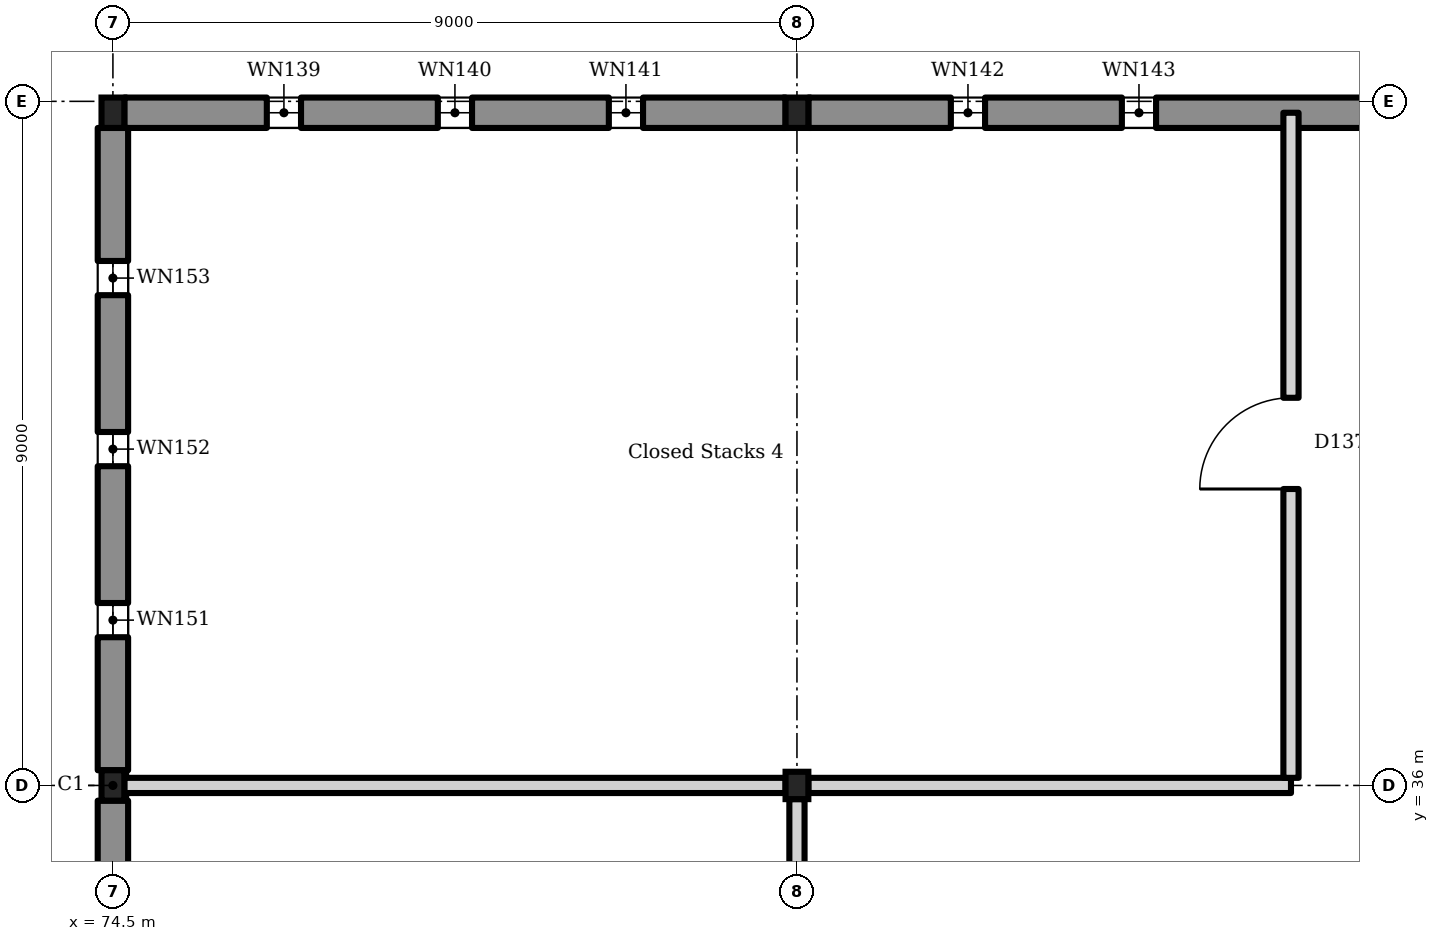
"""IFC4 building model, lengths in metres.
Left out: names, types, materials, properties, quantities, classifications, styles, units other than length and angle.
Written with IfcOpenShell. Run it as: python <this file> out.ifc"""

import sys

from ifc_helpers import new_model, si_unit, direction, frame, frame_2d, origin, origin_2d, place, context, subcontext, project, spatial, rectangle, i_section, extrude, element, fill, save


model = new_model("IFC4")
c1 = context("Model", 3, precision=1e-05, world=origin(), true_north=direction((0.0, 1.0)))
c2 = subcontext(c1, "Body", "Model", "MODEL_VIEW")
j1 = project(units=[si_unit("LENGTHUNIT", "METRE"), si_unit("PLANEANGLEUNIT", "RADIAN")], contexts=[c1])
p1 = place(None, origin())
s1 = spatial("IfcSite", under=j1, at=p1, CompositionType="ELEMENT")
p2 = place(p1, origin())
s2 = spatial("IfcBuilding", under=s1, at=p2, CompositionType="ELEMENT")
p3 = place(p2, frame((0.0, 0.0, 18.9)))
s3 = spatial("IfcBuildingStorey", under=s2, at=p3, CompositionType="ELEMENT", Elevation=18.9)
p4 = place(p3, frame((74.5, 36.0, 0.0), z_axis=(0.0, 0.0, 1.0), x_axis=(1.0, 0.0, 0.0)))
e1 = element("IfcColumn", 1, at=p4, inside=s3, PredefinedType="COLUMN", context=c2, shape_type="SweptSolid", body=[
    extrude(i_section(OverallWidth=0.3, OverallDepth=0.4, WebThickness=0.013, FlangeThickness=0.024, FilletRadius=0.027, at=origin_2d()), origin(), (0.0, 0.0, 1.0), 4.5),
])
p5 = place(p3, frame((83.5, 36.0, 0.0), z_axis=(0.0, 0.0, 1.0), x_axis=(1.0, 0.0, 0.0)))
e2 = element("IfcColumn", 2, at=p5, inside=s3, PredefinedType="COLUMN", context=c2, shape_type="SweptSolid", body=[
    extrude(i_section(OverallWidth=0.3, OverallDepth=0.36, WebThickness=0.012, FlangeThickness=0.022, FilletRadius=0.027, at=origin_2d()), origin(), (0.0, 0.0, 1.0), 4.5),
])
for number, where, z_axis, x_axis in (
    (3, (74.5, 44.85, 0.0), (0.0, 0.0, 1.0), (1.0, 0.0, 0.0)),
    (4, (83.5, 44.85, 0.0), (0.0, 0.0, 1.0), (1.0, 0.0, 0.0)),
):
    element("IfcColumn", number, at=place(p3, frame(where, z_axis=z_axis, x_axis=x_axis)), inside=s3, PredefinedType="COLUMN", context=c2, shape_type="SweptSolid", body=[
        extrude(i_section(OverallWidth=0.3, OverallDepth=0.4, WebThickness=0.013, FlangeThickness=0.024, FilletRadius=0.027, at=origin_2d()), origin(), (0.0, 0.0, 1.0), 4.5),
    ])
p6 = place(p3, frame((74.65, 44.85, 0.0), z_axis=(0.0, 0.0, 1.0), x_axis=(1.0, 0.0, 0.0)))
e5 = element("IfcWall", 5, at=p6, inside=s3, PredefinedType="SOLIDWALL", context=c2, shape_type="SweptSolid", body=[
    extrude(rectangle(XDim=8.7, YDim=0.4, at=frame_2d((4.35, 0.0))), origin(), (0.0, 0.0, 1.0), 4.5),
])
p7 = place(p6, frame((1.875, 0.0, 0.9)))
e6 = element("IfcOpeningElement", 6, at=p7, cuts=e5, PredefinedType="OPENING", context=c2, shape_type="SweptSolid", body=[
    extrude(rectangle(XDim=0.45, YDim=2.6, at=frame_2d((0.225, 1.3))), frame((0.0, 0.21, 0.0), z_axis=(0.0, -1.0, 0.0), x_axis=(1.0, 0.0, 0.0)), (0.0, 0.0, 1.0), 0.42),
])
p8 = place(p6, frame((4.125, 0.0, 0.9)))
e7 = element("IfcOpeningElement", 7, at=p8, cuts=e5, PredefinedType="OPENING", context=c2, shape_type="SweptSolid", body=[
    extrude(rectangle(XDim=0.45, YDim=2.6, at=frame_2d((0.225, 1.3))), frame((0.0, 0.21, 0.0), z_axis=(0.0, -1.0, 0.0), x_axis=(1.0, 0.0, 0.0)), (0.0, 0.0, 1.0), 0.42),
])
p9 = place(p6, frame((6.375, 0.0, 0.9)))
e8 = element("IfcOpeningElement", 8, at=p9, cuts=e5, PredefinedType="OPENING", context=c2, shape_type="SweptSolid", body=[
    extrude(rectangle(XDim=0.45, YDim=2.6, at=frame_2d((0.225, 1.3))), frame((0.0, 0.21, 0.0), z_axis=(0.0, -1.0, 0.0), x_axis=(1.0, 0.0, 0.0)), (0.0, 0.0, 1.0), 0.42),
])
p10 = place(p3, frame((83.65, 44.85, 0.0), z_axis=(0.0, 0.0, 1.0), x_axis=(1.0, 0.0, 0.0)))
e9 = element("IfcWall", 9, at=p10, inside=s3, PredefinedType="SOLIDWALL", context=c2, shape_type="SweptSolid", body=[
    extrude(rectangle(XDim=8.7, YDim=0.4, at=frame_2d((4.35, 0.0))), origin(), (0.0, 0.0, 1.0), 4.5),
])
p11 = place(p10, frame((1.875, 0.0, 0.9)))
e10 = element("IfcOpeningElement", 10, at=p11, cuts=e9, PredefinedType="OPENING", context=c2, shape_type="SweptSolid", body=[
    extrude(rectangle(XDim=0.45, YDim=2.6, at=frame_2d((0.225, 1.3))), frame((0.0, 0.21, 0.0), z_axis=(0.0, -1.0, 0.0), x_axis=(1.0, 0.0, 0.0)), (0.0, 0.0, 1.0), 0.42),
])
p12 = place(p10, frame((4.125, 0.0, 0.9)))
e11 = element("IfcOpeningElement", 11, at=p12, cuts=e9, PredefinedType="OPENING", context=c2, shape_type="SweptSolid", body=[
    extrude(rectangle(XDim=0.45, YDim=2.6, at=frame_2d((0.225, 1.3))), frame((0.0, 0.21, 0.0), z_axis=(0.0, -1.0, 0.0), x_axis=(1.0, 0.0, 0.0)), (0.0, 0.0, 1.0), 0.42),
])
p13 = place(p3, frame((74.5, 27.2, 0.0), z_axis=(0.0, 0.0, 1.0), x_axis=(0.0, 1.0, 0.0)))
e12 = element("IfcWall", 12, at=p13, inside=s3, PredefinedType="SOLIDWALL", context=c2, shape_type="SweptSolid", body=[
    extrude(rectangle(XDim=8.6, YDim=0.4, at=frame_2d((4.3, 0.0))), origin(), (0.0, 0.0, 1.0), 4.5),
])
p14 = place(p13, frame((1.825, 0.0, 0.9)))
e13 = element("IfcOpeningElement", 13, at=p14, cuts=e12, PredefinedType="OPENING", context=c2, shape_type="SweptSolid", body=[
    extrude(rectangle(XDim=0.45, YDim=2.6, at=frame_2d((0.225, 1.3))), frame((0.0, 0.21, 0.0), z_axis=(0.0, -1.0, 0.0), x_axis=(1.0, 0.0, 0.0)), (0.0, 0.0, 1.0), 0.42),
])
p15 = place(p3, frame((74.5, 36.2, 0.0), z_axis=(0.0, 0.0, 1.0), x_axis=(0.0, 1.0, 0.0)))
e14 = element("IfcWall", 14, at=p15, inside=s3, PredefinedType="SOLIDWALL", context=c2, shape_type="SweptSolid", body=[
    extrude(rectangle(XDim=8.45, YDim=0.4, at=frame_2d((4.225, 0.0))), origin(), (0.0, 0.0, 1.0), 4.5),
])
p16 = place(p15, frame((1.75, 0.0, 0.9)))
e15 = element("IfcOpeningElement", 15, at=p16, cuts=e14, PredefinedType="OPENING", context=c2, shape_type="SweptSolid", body=[
    extrude(rectangle(XDim=0.45, YDim=2.6, at=frame_2d((0.225, 1.3))), frame((0.0, 0.21, 0.0), z_axis=(0.0, -1.0, 0.0), x_axis=(1.0, 0.0, 0.0)), (0.0, 0.0, 1.0), 0.42),
])
p17 = place(p15, frame((4.0, 0.0, 0.9)))
e16 = element("IfcOpeningElement", 16, at=p17, cuts=e14, PredefinedType="OPENING", context=c2, shape_type="SweptSolid", body=[
    extrude(rectangle(XDim=0.45, YDim=2.6, at=frame_2d((0.225, 1.3))), frame((0.0, 0.21, 0.0), z_axis=(0.0, -1.0, 0.0), x_axis=(1.0, 0.0, 0.0)), (0.0, 0.0, 1.0), 0.42),
])
p18 = place(p15, frame((6.25, 0.0, 0.9)))
e17 = element("IfcOpeningElement", 17, at=p18, cuts=e14, PredefinedType="OPENING", context=c2, shape_type="SweptSolid", body=[
    extrude(rectangle(XDim=0.45, YDim=2.6, at=frame_2d((0.225, 1.3))), frame((0.0, 0.21, 0.0), z_axis=(0.0, -1.0, 0.0), x_axis=(1.0, 0.0, 0.0)), (0.0, 0.0, 1.0), 0.42),
])
p19 = place(p3, frame((74.65, 36.0, 0.0), z_axis=(0.0, 0.0, 1.0), x_axis=(1.0, 0.0, 0.0)))
e18 = element("IfcWall", 18, at=p19, inside=s3, PredefinedType="SOLIDWALL", context=c2, shape_type="SweptSolid", body=[
    extrude(rectangle(XDim=8.7, YDim=0.2, at=frame_2d((4.35, 0.0))), origin(), (0.0, 0.0, 1.0), 3.6),
])
p20 = place(p3, frame((83.65, 36.0, 0.0), z_axis=(0.0, 0.0, 1.0), x_axis=(1.0, 0.0, 0.0)))
e19 = element("IfcWall", 19, at=p20, inside=s3, PredefinedType="SOLIDWALL", context=c2, shape_type="SweptSolid", body=[
    extrude(rectangle(XDim=6.35, YDim=0.2, at=frame_2d((3.175, 0.0))), origin(), (0.0, 0.0, 1.0), 3.6),
])
p21 = place(p3, frame((83.5, 31.6, 0.0), z_axis=(0.0, 0.0, 1.0), x_axis=(0.0, 1.0, 0.0)))
e20 = element("IfcWall", 20, at=p21, inside=s3, PredefinedType="SOLIDWALL", context=c2, shape_type="SweptSolid", body=[
    extrude(rectangle(XDim=4.22, YDim=0.2, at=frame_2d((2.11, 0.0))), origin(), (0.0, 0.0, 1.0), 3.6),
])
p22 = place(p21, frame((1.55, 0.0, 0.0)))
e21 = element("IfcOpeningElement", 21, at=p22, cuts=e20, PredefinedType="OPENING", context=c2, shape_type="SweptSolid", body=[
    extrude(rectangle(XDim=1.2, YDim=2.1, at=frame_2d((0.6, 1.05))), frame((0.0, 0.11, 0.0), z_axis=(0.0, -1.0, 0.0), x_axis=(1.0, 0.0, 0.0)), (0.0, 0.0, 1.0), 0.22),
])
p23 = place(p3, frame((90.0, 36.1, 0.0), z_axis=(0.0, 0.0, 1.0), x_axis=(0.0, 1.0, 0.0)))
e22 = element("IfcWall", 22, at=p23, inside=s3, PredefinedType="SOLIDWALL", context=c2, shape_type="SweptSolid", body=[
    extrude(rectangle(XDim=8.75, YDim=0.2, at=frame_2d((4.375, 0.0))), origin(), (0.0, 0.0, 1.0), 3.6),
])
p24 = place(p23, frame((3.8, 0.0, 0.0)))
e23 = element("IfcOpeningElement", 23, at=p24, cuts=e22, PredefinedType="OPENING", context=c2, shape_type="SweptSolid", body=[
    extrude(rectangle(XDim=1.2, YDim=2.1, at=frame_2d((0.6, 1.05))), frame((0.0, 0.11, 0.0), z_axis=(0.0, -1.0, 0.0), x_axis=(1.0, 0.0, 0.0)), (0.0, 0.0, 1.0), 0.22),
])
p25 = place(p7, origin())
e24 = element("IfcWindow", 24, at=p25, inside=s3, PartitioningType="SINGLE_PANEL", PredefinedType="WINDOW", context=c2, shape_type="SweptSolid", body=[
    extrude(rectangle(XDim=0.45, YDim=2.6, at=frame_2d((0.225, 1.3))), frame((0.0, 0.03, 0.0), z_axis=(0.0, -1.0, 0.0), x_axis=(1.0, 0.0, 0.0)), (0.0, 0.0, 1.0), 0.06),
])
fill(e6, e24)
p26 = place(p8, origin())
e25 = element("IfcWindow", 25, at=p26, inside=s3, PartitioningType="SINGLE_PANEL", PredefinedType="WINDOW", context=c2, shape_type="SweptSolid", body=[
    extrude(rectangle(XDim=0.45, YDim=2.6, at=frame_2d((0.225, 1.3))), frame((0.0, 0.03, 0.0), z_axis=(0.0, -1.0, 0.0), x_axis=(1.0, 0.0, 0.0)), (0.0, 0.0, 1.0), 0.06),
])
fill(e7, e25)
p27 = place(p9, origin())
e26 = element("IfcWindow", 26, at=p27, inside=s3, PartitioningType="SINGLE_PANEL", PredefinedType="WINDOW", context=c2, shape_type="SweptSolid", body=[
    extrude(rectangle(XDim=0.45, YDim=2.6, at=frame_2d((0.225, 1.3))), frame((0.0, 0.03, 0.0), z_axis=(0.0, -1.0, 0.0), x_axis=(1.0, 0.0, 0.0)), (0.0, 0.0, 1.0), 0.06),
])
fill(e8, e26)
p28 = place(p11, origin())
e27 = element("IfcWindow", 27, at=p28, inside=s3, PartitioningType="SINGLE_PANEL", PredefinedType="WINDOW", context=c2, shape_type="SweptSolid", body=[
    extrude(rectangle(XDim=0.45, YDim=2.6, at=frame_2d((0.225, 1.3))), frame((0.0, 0.03, 0.0), z_axis=(0.0, -1.0, 0.0), x_axis=(1.0, 0.0, 0.0)), (0.0, 0.0, 1.0), 0.06),
])
fill(e10, e27)
p29 = place(p12, origin())
e28 = element("IfcWindow", 28, at=p29, inside=s3, PartitioningType="SINGLE_PANEL", PredefinedType="WINDOW", context=c2, shape_type="SweptSolid", body=[
    extrude(rectangle(XDim=0.45, YDim=2.6, at=frame_2d((0.225, 1.3))), frame((0.0, 0.03, 0.0), z_axis=(0.0, -1.0, 0.0), x_axis=(1.0, 0.0, 0.0)), (0.0, 0.0, 1.0), 0.06),
])
fill(e11, e28)
p30 = place(p16, origin())
e29 = element("IfcWindow", 29, at=p30, inside=s3, PartitioningType="SINGLE_PANEL", PredefinedType="WINDOW", context=c2, shape_type="SweptSolid", body=[
    extrude(rectangle(XDim=0.45, YDim=2.6, at=frame_2d((0.225, 1.3))), frame((0.0, 0.03, 0.0), z_axis=(0.0, -1.0, 0.0), x_axis=(1.0, 0.0, 0.0)), (0.0, 0.0, 1.0), 0.06),
])
fill(e15, e29)
p31 = place(p17, origin())
e30 = element("IfcWindow", 30, at=p31, inside=s3, PartitioningType="SINGLE_PANEL", PredefinedType="WINDOW", context=c2, shape_type="SweptSolid", body=[
    extrude(rectangle(XDim=0.45, YDim=2.6, at=frame_2d((0.225, 1.3))), frame((0.0, 0.03, 0.0), z_axis=(0.0, -1.0, 0.0), x_axis=(1.0, 0.0, 0.0)), (0.0, 0.0, 1.0), 0.06),
])
fill(e16, e30)
p32 = place(p18, origin())
e31 = element("IfcWindow", 31, at=p32, inside=s3, PartitioningType="SINGLE_PANEL", PredefinedType="WINDOW", context=c2, shape_type="SweptSolid", body=[
    extrude(rectangle(XDim=0.45, YDim=2.6, at=frame_2d((0.225, 1.3))), frame((0.0, 0.03, 0.0), z_axis=(0.0, -1.0, 0.0), x_axis=(1.0, 0.0, 0.0)), (0.0, 0.0, 1.0), 0.06),
])
fill(e17, e31)
p33 = place(p24, origin())
e32 = element("IfcDoor", 32, at=p33, inside=s3, OperationType="DOUBLE_DOOR_SINGLE_SWING", PredefinedType="DOOR", context=c2, shape_type="SweptSolid", body=[
    extrude(rectangle(XDim=1.2, YDim=2.1, at=frame_2d((0.6, 1.05))), frame((0.0, 0.025, 0.0), z_axis=(0.0, -1.0, 0.0), x_axis=(1.0, 0.0, 0.0)), (0.0, 0.0, 1.0), 0.05),
])
fill(e23, e32)
save(model, sys.argv[1])
